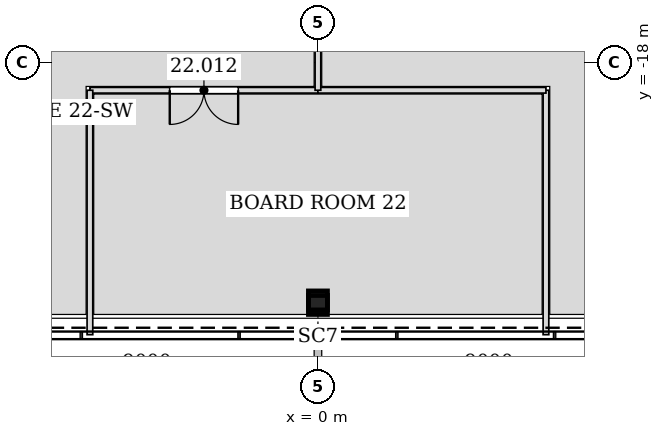
"""IFC4 building model, lengths in metres.
Left out: names, types, materials, properties, quantities, classifications, styles, units other than length and angle.
Written with IfcOpenShell. Run it as: python <this file> out.ifc"""

import sys

from ifc_helpers import new_model, si_unit, direction, frame, frame_2d, origin, origin_2d, place, context, subcontext, project, spatial, rectangle, hollow_rectangle, extrude, element, fill, save


model = new_model("IFC4")
c1 = context("Model", 3, precision=1e-05, world=origin(), true_north=direction((0.0, 1.0)))
c2 = subcontext(c1, "Body", "Model", "MODEL_VIEW")
j1 = project(units=[si_unit("LENGTHUNIT", "METRE"), si_unit("PLANEANGLEUNIT", "RADIAN")], contexts=[c1])
p1 = place(None, origin())
s1 = spatial("IfcSite", under=j1, at=p1, CompositionType="ELEMENT")
p2 = place(p1, origin())
s2 = spatial("IfcBuilding", under=s1, at=p2, CompositionType="ELEMENT")
p3 = place(p2, frame((0.0, 0.0, 100.2)))
s3 = spatial("IfcBuildingStorey", under=s2, at=p3, CompositionType="ELEMENT", Elevation=100.2)
p4 = place(p3, frame((0.0, -24.38, 0.0), z_axis=(0.0, 0.028239619523, 0.999601182417), x_axis=(-1.0, 0.0, 0.0)))
e1 = element("IfcColumn", 1, at=p4, inside=s3, PredefinedType="COLUMN", context=c2, shape_type="SweptSolid", body=[
    extrude(hollow_rectangle(XDim=0.5, YDim=0.5, WallThickness=0.025, at=origin_2d()), origin(), (0.0, 0.0, 1.0), 4.202),
])
p5 = place(p3, frame((0.001, -18.73, 0.0), z_axis=(0.0, 0.0, 1.0), x_axis=(-1.0, 0.0, 0.0)))
e2 = element("IfcWall", 2, at=p5, inside=s3, PredefinedType="PARTITIONING", context=c2, shape_type="SweptSolid", body=[
    extrude(rectangle(XDim=6.001, YDim=0.15, at=frame_2d((3.0, 0.0))), origin(), (0.0, 0.0, 1.0), 2.64),
])
p6 = place(p5, frame((2.101, 0.0, 0.0)))
e3 = element("IfcOpeningElement", 3, at=p6, cuts=e2, PredefinedType="OPENING", context=c2, shape_type="SweptSolid", body=[
    extrude(rectangle(XDim=1.8, YDim=2.4, at=frame_2d((0.9, 1.2))), frame((0.0, 0.085, 0.0), z_axis=(0.0, -1.0, 0.0), x_axis=(1.0, 0.0, 0.0)), (0.0, 0.0, 1.0), 0.17),
])
for number, where, z_axis, x_axis in (
    (4, (-6.0, -18.73, 0.0), (0.0, 0.0, 1.0), (0.0, -1.0, 0.0)),
    (5, (6.0, -25.162, 0.0), (0.0, 0.0, 1.0), (0.0, 1.0, 0.0)),
):
    element("IfcWall", number, at=place(p3, frame(where, z_axis=z_axis, x_axis=x_axis)), inside=s3, PredefinedType="PARTITIONING", context=c2, shape_type="SweptSolid", body=[
        extrude(rectangle(XDim=6.432, YDim=0.15, at=frame_2d((3.216, 0.0))), origin(), (0.0, 0.0, 1.0), 2.99),
    ])
p7 = place(p3, frame((6.0, -18.73, 0.0), z_axis=(0.0, 0.0, 1.0), x_axis=(-1.0, 0.0, 0.0)))
e6 = element("IfcWall", 6, at=p7, inside=s3, PredefinedType="PARTITIONING", context=c2, shape_type="SweptSolid", body=[
    extrude(rectangle(XDim=6.001, YDim=0.15, at=frame_2d((3.0, 0.0))), origin(), (0.0, 0.0, 1.0), 2.64),
])
p8 = place(p3, frame((0.0, -18.73, 0.0), z_axis=(0.0, 0.0, 1.0), x_axis=(0.0, 1.0, 0.0)))
e7 = element("IfcWall", 7, at=p8, inside=s3, PredefinedType="PARTITIONING", context=c2, shape_type="SweptSolid", body=[
    extrude(rectangle(XDim=5.68, YDim=0.15, at=frame_2d((2.84, 0.0))), origin(), (0.0, 0.0, 1.0), 2.64),
])
p9 = place(p6, origin())
e8 = element("IfcDoor", 8, at=p9, inside=s3, OperationType="DOUBLE_DOOR_SINGLE_SWING", PredefinedType="DOOR", context=c2, shape_type="SweptSolid", body=[
    extrude(rectangle(XDim=1.8, YDim=2.4, at=frame_2d((0.9, 1.2))), frame((0.0, 0.025, 0.0), z_axis=(0.0, -1.0, 0.0), x_axis=(1.0, 0.0, 0.0)), (0.0, 0.0, 1.0), 0.05),
])
fill(e3, e8)
save(model, sys.argv[1])
